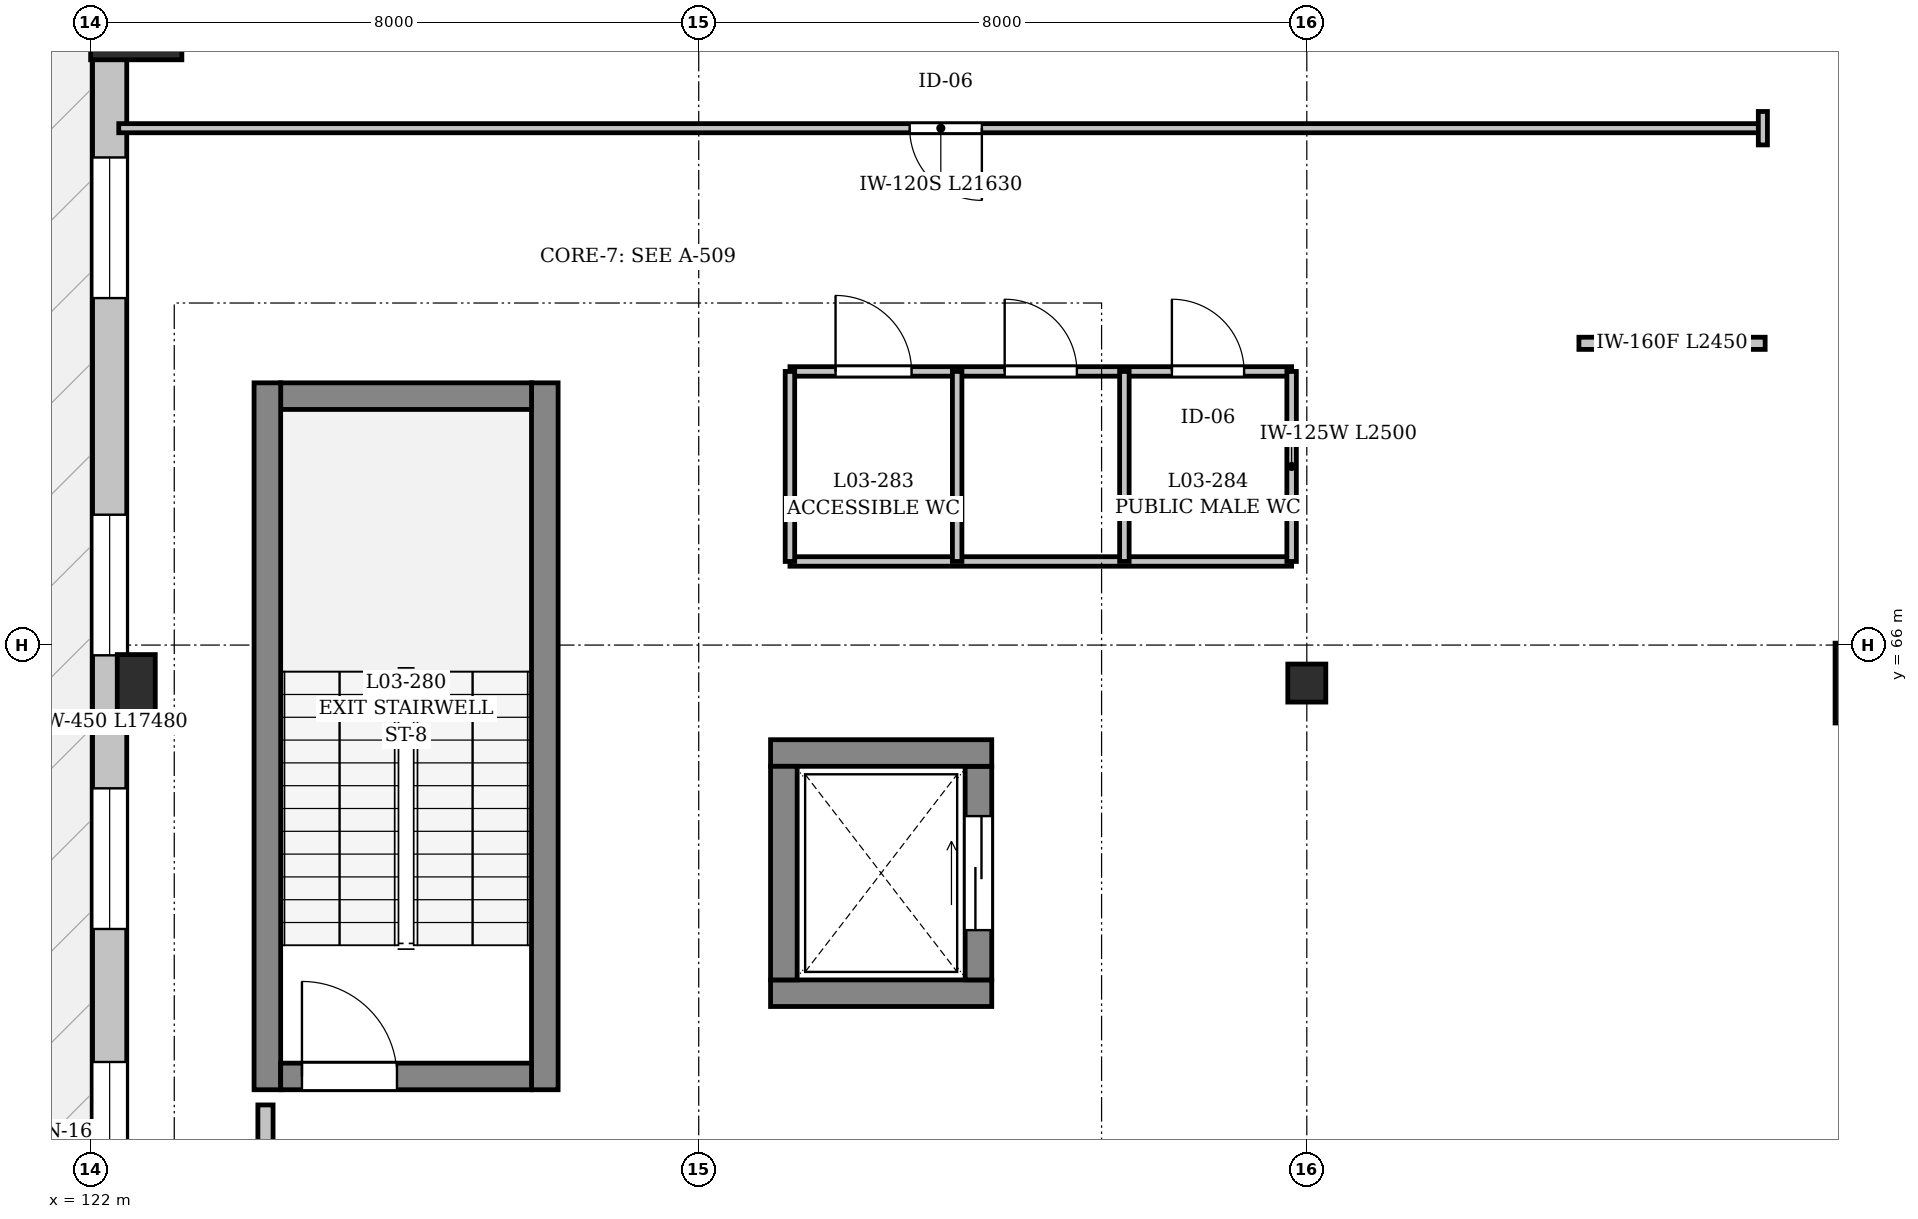
"""IFC4 building model, lengths in metres.
Left out: names, types, materials, properties, quantities, classifications, styles, units other than length and angle.
Written with IfcOpenShell. Run it as: python <this file> out.ifc"""

import sys

from ifc_helpers import new_model, si_unit, direction, frame, frame_2d, origin, origin_2d, place, context, subcontext, project, spatial, rectangle, extrude, element, fill, save


model = new_model("IFC4")
c1 = context("Model", 3, precision=1e-05, world=origin(), true_north=direction((0.0, 1.0)))
c2 = subcontext(c1, "Body", "Model", "MODEL_VIEW")
j1 = project(units=[si_unit("LENGTHUNIT", "METRE"), si_unit("PLANEANGLEUNIT", "RADIAN")], contexts=[c1])
p1 = place(None, origin())
s1 = spatial("IfcSite", under=j1, at=p1, CompositionType="ELEMENT")
p2 = place(p1, origin())
s2 = spatial("IfcBuilding", under=s1, at=p2, CompositionType="ELEMENT")
p3 = place(p2, frame((0.0, 0.0, 10.2)))
s3 = spatial("IfcBuildingStorey", under=s2, at=p3, CompositionType="ELEMENT", Elevation=10.2)
p4 = place(p3, frame((122.6, 65.5, 0.0), z_axis=(0.0, 0.0, 1.0), x_axis=(1.0, 0.0, 0.0)))
e1 = element("IfcColumn", 1, at=p4, inside=s3, PredefinedType="COLUMN", context=c2, shape_type="SweptSolid", body=[
    extrude(rectangle(XDim=0.5, YDim=0.75, at=origin_2d()), origin(), (0.0, 0.0, 1.0), 4.5),
])
p5 = place(p3, frame((122.6, 74.3, 0.0), z_axis=(0.0, 0.0, 1.0), x_axis=(1.0, 0.0, 0.0)))
e2 = element("IfcColumn", 2, at=p5, inside=s3, PredefinedType="COLUMN", context=c2, shape_type="SweptSolid", body=[
    extrude(rectangle(XDim=1.2, YDim=1.2, at=origin_2d()), origin(), (0.0, 0.0, 1.0), 4.5),
])
p6 = place(p3, frame((138.0, 65.5, 0.0), z_axis=(0.0, 0.0, 1.0), x_axis=(1.0, 0.0, 0.0)))
e3 = element("IfcColumn", 3, at=p6, inside=s3, PredefinedType="COLUMN", context=c2, shape_type="SweptSolid", body=[
    extrude(rectangle(XDim=0.5, YDim=0.5, at=origin_2d()), origin(), (0.0, 0.0, 1.0), 4.5),
])
p7 = place(p3, frame((145.3, 65.5, 0.0), z_axis=(0.0, 0.0, 1.0), x_axis=(1.0, 0.0, 0.0)))
e4 = element("IfcColumn", 4, at=p7, inside=s3, PredefinedType="COLUMN", context=c2, shape_type="SweptSolid", body=[
    extrude(rectangle(XDim=0.7, YDim=1.05, at=origin_2d()), origin(), (0.0, 0.0, 1.0), 4.5),
])
p8 = place(p3, frame((122.25, 56.25, 0.0), z_axis=(0.0, 0.0, 1.0), x_axis=(0.0, 1.0, 0.0)))
e5 = element("IfcWall", 5, at=p8, inside=s3, PredefinedType="SOLIDWALL", context=c2, shape_type="SweptSolid", body=[
    extrude(rectangle(XDim=17.48, YDim=0.45, at=frame_2d((8.74, 0.0))), origin(), (0.0, 0.0, 1.0), 3.49),
])
p9 = place(p8, frame((2.415, 0.0, 0.9)))
e6 = element("IfcOpeningElement", 6, at=p9, cuts=e5, PredefinedType="OPENING", context=c2, shape_type="SweptSolid", body=[
    extrude(rectangle(XDim=1.85, YDim=1.5, at=frame_2d((0.925, 0.75))), frame((0.0, 0.235, 0.0), z_axis=(0.0, -1.0, 0.0), x_axis=(1.0, 0.0, 0.0)), (0.0, 0.0, 1.0), 0.47),
])
p10 = place(p8, frame((6.015, 0.0, 0.9)))
e7 = element("IfcOpeningElement", 7, at=p10, cuts=e5, PredefinedType="OPENING", context=c2, shape_type="SweptSolid", body=[
    extrude(rectangle(XDim=1.85, YDim=1.5, at=frame_2d((0.925, 0.75))), frame((0.0, 0.235, 0.0), z_axis=(0.0, -1.0, 0.0), x_axis=(1.0, 0.0, 0.0)), (0.0, 0.0, 1.0), 0.47),
])
p11 = place(p8, frame((9.615, 0.0, 0.9)))
e8 = element("IfcOpeningElement", 8, at=p11, cuts=e5, PredefinedType="OPENING", context=c2, shape_type="SweptSolid", body=[
    extrude(rectangle(XDim=1.85, YDim=1.5, at=frame_2d((0.925, 0.75))), frame((0.0, 0.235, 0.0), z_axis=(0.0, -1.0, 0.0), x_axis=(1.0, 0.0, 0.0)), (0.0, 0.0, 1.0), 0.47),
])
p12 = place(p8, frame((14.315, 0.0, 0.9)))
e9 = element("IfcOpeningElement", 9, at=p12, cuts=e5, PredefinedType="OPENING", context=c2, shape_type="SweptSolid", body=[
    extrude(rectangle(XDim=1.85, YDim=1.5, at=frame_2d((0.925, 0.75))), frame((0.0, 0.235, 0.0), z_axis=(0.0, -1.0, 0.0), x_axis=(1.0, 0.0, 0.0)), (0.0, 0.0, 1.0), 0.47),
])
p13 = place(p3, frame((127.975, 60.15, 0.0), z_axis=(0.0, 0.0, 1.0), x_axis=(0.0, 1.0, 0.0)))
e10 = element("IfcWall", 10, at=p13, inside=s3, PredefinedType="SHEAR", context=c2, shape_type="SweptSolid", body=[
    extrude(rectangle(XDim=9.3, YDim=0.35, at=frame_2d((4.65, 0.0))), origin(), (0.0, 0.0, 1.0), 4.5),
])
p14 = place(p3, frame((127.8, 69.275, 0.0), z_axis=(0.0, 0.0, 1.0), x_axis=(-1.0, 0.0, 0.0)))
e11 = element("IfcWall", 11, at=p14, inside=s3, PredefinedType="SHEAR", context=c2, shape_type="SweptSolid", body=[
    extrude(rectangle(XDim=3.3, YDim=0.35, at=frame_2d((1.65, 0.0))), origin(), (0.0, 0.0, 1.0), 4.5),
])
p15 = place(p3, frame((124.325, 69.45, 0.0), z_axis=(0.0, 0.0, 1.0), x_axis=(0.0, -1.0, 0.0)))
e12 = element("IfcWall", 12, at=p15, inside=s3, PredefinedType="SHEAR", context=c2, shape_type="SweptSolid", body=[
    extrude(rectangle(XDim=9.3, YDim=0.35, at=frame_2d((4.65, 0.0))), origin(), (0.0, 0.0, 1.0), 4.5),
])
p16 = place(p3, frame((124.5, 60.325, 0.0), z_axis=(0.0, 0.0, 1.0), x_axis=(1.0, 0.0, 0.0)))
e13 = element("IfcWall", 13, at=p16, inside=s3, PredefinedType="SHEAR", context=c2, shape_type="SweptSolid", body=[
    extrude(rectangle(XDim=3.3, YDim=0.35, at=frame_2d((1.65, 0.0))), origin(), (0.0, 0.0, 1.0), 4.5),
])
p17 = place(p16, frame((0.28, 0.0, 0.0)))
e14 = element("IfcOpeningElement", 14, at=p17, cuts=e13, PredefinedType="OPENING", context=c2, shape_type="SweptSolid", body=[
    extrude(rectangle(XDim=1.25, YDim=2.2, at=frame_2d((0.625, 1.1))), frame((0.0, 0.185, 0.0), z_axis=(0.0, -1.0, 0.0), x_axis=(1.0, 0.0, 0.0)), (0.0, 0.0, 1.0), 0.37),
])
p18 = place(p3, frame((130.945, 61.42, 0.0), z_axis=(0.0, 0.0, 1.0), x_axis=(1.0, 0.0, 0.0)))
e15 = element("IfcWall", 15, at=p18, inside=s3, PredefinedType="SHEAR", context=c2, shape_type="SweptSolid", body=[
    extrude(rectangle(XDim=2.91, YDim=0.35, at=frame_2d((1.455, 0.0))), origin(), (0.0, 0.0, 1.0), 4.5),
])
p19 = place(p3, frame((133.68, 61.595, 0.0), z_axis=(0.0, 0.0, 1.0), x_axis=(0.0, 1.0, 0.0)))
e16 = element("IfcWall", 16, at=p19, inside=s3, PredefinedType="SHEAR", context=c2, shape_type="SweptSolid", body=[
    extrude(rectangle(XDim=2.81, YDim=0.35, at=frame_2d((1.405, 0.0))), origin(), (0.0, 0.0, 1.0), 4.5),
])
p20 = place(p19, frame((0.655, 0.0, 0.0)))
e17 = element("IfcOpeningElement", 17, at=p20, cuts=e16, PredefinedType="OPENING", context=c2, shape_type="SweptSolid", body=[
    extrude(rectangle(XDim=1.5, YDim=2.3, at=frame_2d((0.75, 1.15))), frame((0.0, 0.185, 0.0), z_axis=(0.0, -1.0, 0.0), x_axis=(1.0, 0.0, 0.0)), (0.0, 0.0, 1.0), 0.37),
])
p21 = place(p3, frame((133.855, 64.58, 0.0), z_axis=(0.0, 0.0, 1.0), x_axis=(-1.0, 0.0, 0.0)))
e18 = element("IfcWall", 18, at=p21, inside=s3, PredefinedType="SHEAR", context=c2, shape_type="SweptSolid", body=[
    extrude(rectangle(XDim=2.91, YDim=0.35, at=frame_2d((1.455, 0.0))), origin(), (0.0, 0.0, 1.0), 4.5),
])
p22 = place(p3, frame((131.12, 64.405, 0.0), z_axis=(0.0, 0.0, 1.0), x_axis=(0.0, -1.0, 0.0)))
e19 = element("IfcWall", 19, at=p22, inside=s3, PredefinedType="SHEAR", context=c2, shape_type="SweptSolid", body=[
    extrude(rectangle(XDim=2.81, YDim=0.35, at=frame_2d((1.405, 0.0))), origin(), (0.0, 0.0, 1.0), 4.5),
])
p23 = place(p3, frame((131.2, 69.6, 0.0), z_axis=(0.0, 0.0, 1.0), x_axis=(1.0, 0.0, 0.0)))
e20 = element("IfcWall", 20, at=p23, inside=s3, PredefinedType="PARTITIONING", context=c2, shape_type="SweptSolid", body=[
    extrude(rectangle(XDim=6.6, YDim=0.125, at=frame_2d((3.3, 0.0))), origin(), (0.0, 0.0, 1.0), 4.5),
])
p24 = place(p23, frame((0.6, 0.0, 0.0)))
e21 = element("IfcOpeningElement", 21, at=p24, cuts=e20, PredefinedType="OPENING", context=c2, shape_type="SweptSolid", body=[
    extrude(rectangle(XDim=1.0, YDim=2.2, at=frame_2d((0.5, 1.1))), frame((0.0, 0.073, 0.0), z_axis=(0.0, -1.0, 0.0), x_axis=(1.0, 0.0, 0.0)), (0.0, 0.0, 1.0), 0.145),
])
p25 = place(p23, frame((2.825, 0.0, 0.0)))
e22 = element("IfcOpeningElement", 22, at=p25, cuts=e20, PredefinedType="OPENING", context=c2, shape_type="SweptSolid", body=[
    extrude(rectangle(XDim=0.95, YDim=2.2, at=frame_2d((0.475, 1.1))), frame((0.0, 0.073, 0.0), z_axis=(0.0, -1.0, 0.0), x_axis=(1.0, 0.0, 0.0)), (0.0, 0.0, 1.0), 0.145),
])
p26 = place(p23, frame((5.025, 0.0, 0.0)))
e23 = element("IfcOpeningElement", 23, at=p26, cuts=e20, PredefinedType="OPENING", context=c2, shape_type="SweptSolid", body=[
    extrude(rectangle(XDim=0.95, YDim=2.2, at=frame_2d((0.475, 1.1))), frame((0.0, 0.073, 0.0), z_axis=(0.0, -1.0, 0.0), x_axis=(1.0, 0.0, 0.0)), (0.0, 0.0, 1.0), 0.145),
])
p27 = place(p3, frame((131.2, 67.1, 0.0), z_axis=(0.0, 0.0, 1.0), x_axis=(1.0, 0.0, 0.0)))
e24 = element("IfcWall", 24, at=p27, inside=s3, PredefinedType="PARTITIONING", context=c2, shape_type="SweptSolid", body=[
    extrude(rectangle(XDim=6.6, YDim=0.125, at=frame_2d((3.3, 0.0))), origin(), (0.0, 0.0, 1.0), 4.5),
])
p28 = place(p3, frame((131.2, 67.1, 0.0), z_axis=(0.0, 0.0, 1.0), x_axis=(0.0, 1.0, 0.0)))
e25 = element("IfcWall", 25, at=p28, inside=s3, PredefinedType="PARTITIONING", context=c2, shape_type="SweptSolid", body=[
    extrude(rectangle(XDim=2.5, YDim=0.125, at=frame_2d((1.25, 0.0))), origin(), (0.0, 0.0, 1.0), 4.5),
])
p29 = place(p3, frame((137.8, 67.1, 0.0), z_axis=(0.0, 0.0, 1.0), x_axis=(0.0, 1.0, 0.0)))
e26 = element("IfcWall", 26, at=p29, inside=s3, PredefinedType="PARTITIONING", context=c2, shape_type="SweptSolid", body=[
    extrude(rectangle(XDim=2.5, YDim=0.125, at=frame_2d((1.25, 0.0))), origin(), (0.0, 0.0, 1.0), 3.95),
])
for number, where, z_axis, x_axis in (
    (27, (133.4, 67.1, 0.0), (0.0, 0.0, 1.0), (0.0, 1.0, 0.0)),
    (28, (135.6, 67.1, 0.0), (0.0, 0.0, 1.0), (0.0, 1.0, 0.0)),
):
    element("IfcWall", number, at=place(p3, frame(where, z_axis=z_axis, x_axis=x_axis)), inside=s3, PredefinedType="PARTITIONING", context=c2, shape_type="SweptSolid", body=[
        extrude(rectangle(XDim=2.5, YDim=0.125, at=frame_2d((1.25, 0.0))), origin(), (0.0, 0.0, 1.0), 4.5),
    ])
p30 = place(p3, frame((124.3, 59.95, 0.0), z_axis=(0.0, 0.0, 1.0), x_axis=(0.0, -1.0, 0.0)))
e29 = element("IfcWall", 29, at=p30, inside=s3, PredefinedType="PARTITIONING", context=c2, shape_type="SweptSolid", body=[
    extrude(rectangle(XDim=2.5, YDim=0.2, at=frame_2d((1.25, 0.0))), origin(), (0.0, 0.0, 1.0), 4.5),
])
p31 = place(p30, frame((0.625, 0.0, 0.0)))
e30 = element("IfcOpeningElement", 30, at=p31, cuts=e29, PredefinedType="OPENING", context=c2, shape_type="SweptSolid", body=[
    extrude(rectangle(XDim=1.25, YDim=2.2, at=frame_2d((0.625, 1.1))), frame((0.0, 0.11, 0.0), z_axis=(0.0, -1.0, 0.0), x_axis=(1.0, 0.0, 0.0)), (0.0, 0.0, 1.0), 0.22),
])
p32 = place(p3, frame((144.0, 72.8, 0.0), z_axis=(0.0, 0.0, 1.0), x_axis=(-1.0, 0.0, 0.0)))
e31 = element("IfcWall", 31, at=p32, inside=s3, PredefinedType="PARTITIONING", context=c2, shape_type="SweptSolid", body=[
    extrude(rectangle(XDim=21.63, YDim=0.12, at=frame_2d((10.815, 0.0))), origin(), (0.0, 0.0, 1.0), 3.74),
])
p33 = place(p32, frame((10.275, 0.0, 0.0)))
e32 = element("IfcOpeningElement", 32, at=p33, cuts=e31, PredefinedType="OPENING", context=c2, shape_type="SweptSolid", body=[
    extrude(rectangle(XDim=0.95, YDim=2.2, at=frame_2d((0.475, 1.1))), frame((0.0, 0.07, 0.0), z_axis=(0.0, -1.0, 0.0), x_axis=(1.0, 0.0, 0.0)), (0.0, 0.0, 1.0), 0.14),
])
p34 = place(p3, frame((144.03, 69.97, 0.0), z_axis=(0.0, 0.0, 1.0), x_axis=(-1.0, 0.0, 0.0)))
e33 = element("IfcWall", 33, at=p34, inside=s3, PredefinedType="PARTITIONING", context=c2, shape_type="SweptSolid", body=[
    extrude(rectangle(XDim=2.45, YDim=0.16, at=frame_2d((1.225, 0.0))), origin(), (0.0, 0.0, 1.0), 3.84),
])
p35 = place(p3, frame((144.0, 73.02, 0.0), z_axis=(0.0, 0.0, 1.0), x_axis=(0.0, -1.0, 0.0)))
e34 = element("IfcWall", 34, at=p35, inside=s3, PredefinedType="PARTITIONING", context=c2, shape_type="SweptSolid", body=[
    extrude(rectangle(XDim=0.44, YDim=0.12, at=frame_2d((0.22, 0.0))), origin(), (0.0, 0.0, 1.0), 4.5),
])
p36 = place(p9, origin())
e35 = element("IfcWindow", 35, at=p36, inside=s3, PartitioningType="DOUBLE_PANEL_VERTICAL", PredefinedType="WINDOW", context=c2, shape_type="SweptSolid", body=[
    extrude(rectangle(XDim=1.85, YDim=1.5, at=frame_2d((0.925, 0.75))), frame((0.0, 0.03, 0.0), z_axis=(0.0, -1.0, 0.0), x_axis=(1.0, 0.0, 0.0)), (0.0, 0.0, 1.0), 0.06),
])
fill(e6, e35)
p37 = place(p10, origin())
e36 = element("IfcWindow", 36, at=p37, inside=s3, PartitioningType="DOUBLE_PANEL_VERTICAL", PredefinedType="WINDOW", context=c2, shape_type="SweptSolid", body=[
    extrude(rectangle(XDim=1.85, YDim=1.5, at=frame_2d((0.925, 0.75))), frame((0.0, 0.03, 0.0), z_axis=(0.0, -1.0, 0.0), x_axis=(1.0, 0.0, 0.0)), (0.0, 0.0, 1.0), 0.06),
])
fill(e7, e36)
p38 = place(p11, origin())
e37 = element("IfcWindow", 37, at=p38, inside=s3, PartitioningType="DOUBLE_PANEL_VERTICAL", PredefinedType="WINDOW", context=c2, shape_type="SweptSolid", body=[
    extrude(rectangle(XDim=1.85, YDim=1.5, at=frame_2d((0.925, 0.75))), frame((0.0, 0.03, 0.0), z_axis=(0.0, -1.0, 0.0), x_axis=(1.0, 0.0, 0.0)), (0.0, 0.0, 1.0), 0.06),
])
fill(e8, e37)
p39 = place(p12, origin())
e38 = element("IfcWindow", 38, at=p39, inside=s3, PartitioningType="DOUBLE_PANEL_VERTICAL", PredefinedType="WINDOW", context=c2, shape_type="SweptSolid", body=[
    extrude(rectangle(XDim=1.85, YDim=1.5, at=frame_2d((0.925, 0.75))), frame((0.0, 0.03, 0.0), z_axis=(0.0, -1.0, 0.0), x_axis=(1.0, 0.0, 0.0)), (0.0, 0.0, 1.0), 0.06),
])
fill(e9, e38)
p40 = place(p17, origin())
e39 = element("IfcDoor", 39, at=p40, inside=s3, OperationType="SINGLE_SWING_RIGHT", PredefinedType="DOOR", context=c2, shape_type="SweptSolid", body=[
    extrude(rectangle(XDim=1.25, YDim=2.2, at=frame_2d((0.625, 1.1))), frame((0.0, 0.025, 0.0), z_axis=(0.0, -1.0, 0.0), x_axis=(1.0, 0.0, 0.0)), (0.0, 0.0, 1.0), 0.05),
])
fill(e14, e39)
p41 = place(p20, origin())
e40 = element("IfcDoor", 40, at=p41, inside=s3, OperationType="SLIDING_TO_LEFT", PredefinedType="DOOR", context=c2, shape_type="SweptSolid", body=[
    extrude(rectangle(XDim=1.5, YDim=2.3, at=frame_2d((0.75, 1.15))), frame((0.0, 0.025, 0.0), z_axis=(0.0, -1.0, 0.0), x_axis=(1.0, 0.0, 0.0)), (0.0, 0.0, 1.0), 0.05),
])
fill(e17, e40)
p42 = place(p24, origin())
e41 = element("IfcDoor", 41, at=p42, inside=s3, OperationType="SINGLE_SWING_LEFT", PredefinedType="DOOR", context=c2, shape_type="SweptSolid", body=[
    extrude(rectangle(XDim=1.0, YDim=2.2, at=frame_2d((0.5, 1.1))), frame((0.0, 0.025, 0.0), z_axis=(0.0, -1.0, 0.0), x_axis=(1.0, 0.0, 0.0)), (0.0, 0.0, 1.0), 0.05),
])
fill(e21, e41)
p43 = place(p25, origin())
e42 = element("IfcDoor", 42, at=p43, inside=s3, OperationType="SINGLE_SWING_RIGHT", PredefinedType="DOOR", context=c2, shape_type="SweptSolid", body=[
    extrude(rectangle(XDim=0.95, YDim=2.2, at=frame_2d((0.475, 1.1))), frame((0.0, 0.025, 0.0), z_axis=(0.0, -1.0, 0.0), x_axis=(1.0, 0.0, 0.0)), (0.0, 0.0, 1.0), 0.05),
])
fill(e22, e42)
p44 = place(p26, origin())
e43 = element("IfcDoor", 43, at=p44, inside=s3, OperationType="SINGLE_SWING_LEFT", PredefinedType="DOOR", context=c2, shape_type="SweptSolid", body=[
    extrude(rectangle(XDim=0.95, YDim=2.2, at=frame_2d((0.475, 1.1))), frame((0.0, 0.025, 0.0), z_axis=(0.0, -1.0, 0.0), x_axis=(1.0, 0.0, 0.0)), (0.0, 0.0, 1.0), 0.05),
])
fill(e23, e43)
p45 = place(p33, origin())
e44 = element("IfcDoor", 44, at=p45, inside=s3, OperationType="SINGLE_SWING_RIGHT", PredefinedType="DOOR", context=c2, shape_type="SweptSolid", body=[
    extrude(rectangle(XDim=0.95, YDim=2.2, at=frame_2d((0.475, 1.1))), frame((0.0, 0.025, 0.0), z_axis=(0.0, -1.0, 0.0), x_axis=(1.0, 0.0, 0.0)), (0.0, 0.0, 1.0), 0.05),
])
fill(e32, e44)
save(model, sys.argv[1])
